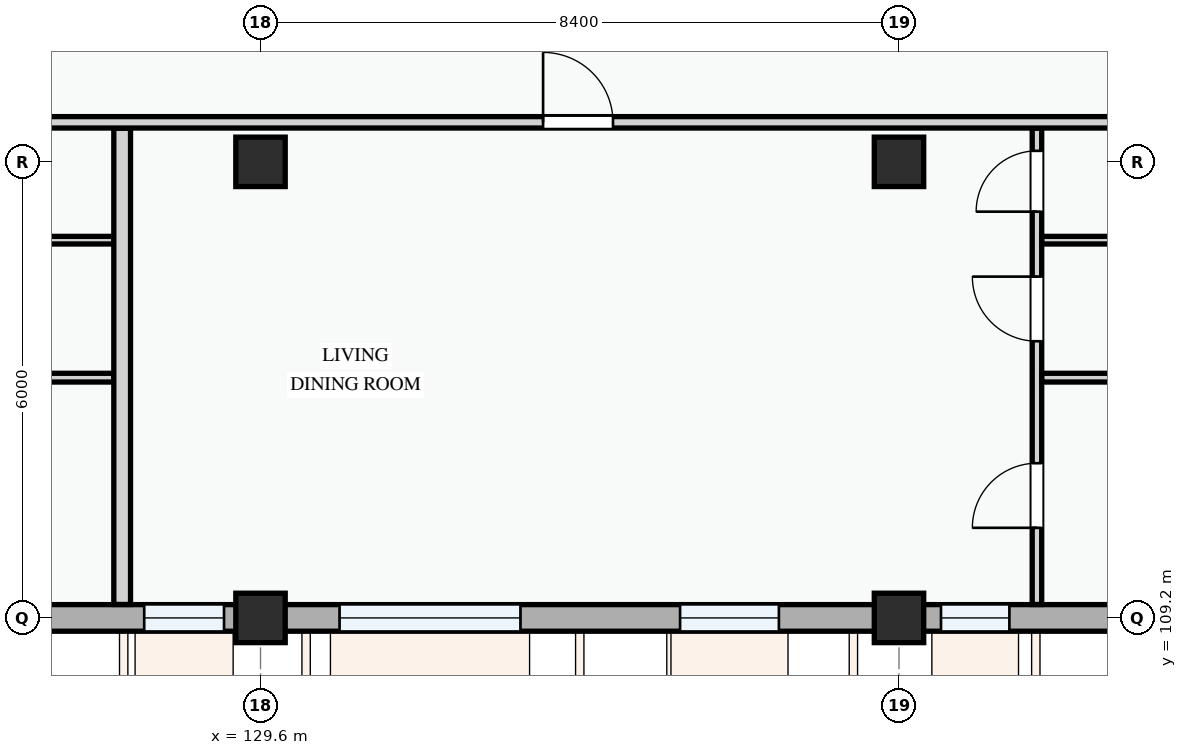
"""IFC4 building model, lengths in metres.
Left out: names, types, materials, properties, quantities, classifications, styles, units other than length and angle.
Written with IfcOpenShell. Run it as: python <this file> out.ifc"""

import sys

from ifc_helpers import new_model, si_unit, direction, frame, frame_2d, origin, origin_2d, place, context, subcontext, project, spatial, rectangle, extrude, element, fill, save


model = new_model("IFC4")
c1 = context("Model", 3, precision=1e-05, world=origin(), true_north=direction((0.0, 1.0)))
c2 = subcontext(c1, "Body", "Model", "MODEL_VIEW")
j1 = project(units=[si_unit("LENGTHUNIT", "METRE"), si_unit("PLANEANGLEUNIT", "RADIAN")], contexts=[c1])
p1 = place(None, origin())
s1 = spatial("IfcSite", under=j1, at=p1, CompositionType="ELEMENT")
p2 = place(p1, origin())
s2 = spatial("IfcBuilding", under=s1, at=p2, CompositionType="ELEMENT")
p3 = place(p2, frame((0.0, 0.0, 11.4)))
s3 = spatial("IfcBuildingStorey", under=s2, at=p3, CompositionType="ELEMENT", Elevation=11.4)
for number, where, z_axis, x_axis in (
    (1, (129.6, 109.2, 0.0), (0.0, 0.0, 1.0), (1.0, 0.0, 0.0)),
    (2, (129.6, 115.2, 0.0), (0.0, 0.0, 1.0), (1.0, 0.0, 0.0)),
    (3, (138.0, 109.2, 0.0), (0.0, 0.0, 1.0), (1.0, 0.0, 0.0)),
    (4, (138.0, 115.2, 0.0), (0.0, 0.0, 1.0), (1.0, 0.0, 0.0)),
):
    element("IfcColumn", number, at=place(p3, frame(where, z_axis=z_axis, x_axis=x_axis)), inside=s3, PredefinedType="COLUMN", context=c2, shape_type="SweptSolid", body=[
        extrude(rectangle(XDim=0.65, YDim=0.65, at=origin_2d()), origin(), (0.0, 0.0, 1.0), 3.3),
    ])
p4 = place(p3, frame((123.6, 109.2, 0.0), z_axis=(0.0, 0.0, 1.0), x_axis=(1.0, 0.0, 0.0)))
e5 = element("IfcWall", 5, at=p4, inside=s3, PredefinedType="STANDARD", context=c2, shape_type="SweptSolid", body=[
    extrude(rectangle(XDim=6.0, YDim=0.35, at=frame_2d((3.0, 0.0))), origin(), (0.0, 0.0, 1.0), 2.475),
])
p5 = place(p4, frame((1.51, 0.0, 0.78)))
e6 = element("IfcOpeningElement", 6, at=p5, cuts=e5, PredefinedType="OPENING", context=c2, shape_type="SweptSolid", body=[
    extrude(rectangle(XDim=1.35, YDim=1.55, at=frame_2d((0.675, 0.775))), frame((0.0, 0.185, 0.0), z_axis=(0.0, -1.0, 0.0), x_axis=(1.0, 0.0, 0.0)), (0.0, 0.0, 1.0), 0.37),
])
p6 = place(p4, frame((4.47, 0.0, 0.78)))
e7 = element("IfcOpeningElement", 7, at=p6, cuts=e5, PredefinedType="OPENING", context=c2, shape_type="SweptSolid", body=[
    extrude(rectangle(XDim=1.05, YDim=1.2, at=frame_2d((0.525, 0.6))), frame((0.0, 0.185, 0.0), z_axis=(0.0, -1.0, 0.0), x_axis=(1.0, 0.0, 0.0)), (0.0, 0.0, 1.0), 0.37),
])
p7 = place(p3, frame((129.6, 109.2, 0.0), z_axis=(0.0, 0.0, 1.0), x_axis=(1.0, 0.0, 0.0)))
e8 = element("IfcWall", 8, at=p7, inside=s3, PredefinedType="STANDARD", context=c2, shape_type="SweptSolid", body=[
    extrude(rectangle(XDim=8.4, YDim=0.35, at=frame_2d((4.2, 0.0))), origin(), (0.0, 0.0, 1.0), 2.375),
])
p8 = place(p7, frame((1.04, 0.0, 0.78)))
e9 = element("IfcOpeningElement", 9, at=p8, cuts=e8, PredefinedType="OPENING", context=c2, shape_type="SweptSolid", body=[
    extrude(rectangle(XDim=2.38, YDim=1.48, at=frame_2d((1.19, 0.74))), frame((0.0, 0.185, 0.0), z_axis=(0.0, -1.0, 0.0), x_axis=(1.0, 0.0, 0.0)), (0.0, 0.0, 1.0), 0.37),
])
p9 = place(p7, frame((5.52, 0.0, 0.78)))
e10 = element("IfcOpeningElement", 10, at=p9, cuts=e8, PredefinedType="OPENING", context=c2, shape_type="SweptSolid", body=[
    extrude(rectangle(XDim=1.3, YDim=1.4, at=frame_2d((0.65, 0.7))), frame((0.0, 0.185, 0.0), z_axis=(0.0, -1.0, 0.0), x_axis=(1.0, 0.0, 0.0)), (0.0, 0.0, 1.0), 0.37),
])
p10 = place(p3, frame((138.0, 109.2, 0.0), z_axis=(0.0, 0.0, 1.0), x_axis=(1.0, 0.0, 0.0)))
e11 = element("IfcWall", 11, at=p10, inside=s3, PredefinedType="STANDARD", context=c2, shape_type="SweptSolid", body=[
    extrude(rectangle(XDim=6.0, YDim=0.35, at=frame_2d((3.0, 0.0))), origin(), (0.0, 0.0, 1.0), 2.475),
])
p11 = place(p10, frame((0.552, 0.0, 0.78)))
e12 = element("IfcOpeningElement", 12, at=p11, cuts=e11, PredefinedType="OPENING", context=c2, shape_type="SweptSolid", body=[
    extrude(rectangle(XDim=0.9, YDim=1.2, at=frame_2d((0.45, 0.6))), frame((0.0, 0.185, 0.0), z_axis=(0.0, -1.0, 0.0), x_axis=(1.0, 0.0, 0.0)), (0.0, 0.0, 1.0), 0.37),
])
p12 = place(p10, frame((2.913, 0.0, 0.78)))
e13 = element("IfcOpeningElement", 13, at=p12, cuts=e11, PredefinedType="OPENING", context=c2, shape_type="SweptSolid", body=[
    extrude(rectangle(XDim=1.8, YDim=1.5, at=frame_2d((0.9, 0.75))), frame((0.0, 0.185, 0.0), z_axis=(0.0, -1.0, 0.0), x_axis=(1.0, 0.0, 0.0)), (0.0, 0.0, 1.0), 0.37),
])
p13 = place(p3, frame((117.014, 112.361, 0.0), z_axis=(0.0, 0.0, 1.0), x_axis=(1.0, 0.0, 0.0)))
e14 = element("IfcWall", 14, at=p13, inside=s3, PredefinedType="PARTITIONING", context=c2, shape_type="SweptSolid", body=[
    extrude(rectangle(XDim=10.654, YDim=0.115, at=frame_2d((5.327, 0.0))), origin(), (0.0, 0.0, 1.0), 3.0),
])
p14 = place(p3, frame((117.014, 114.17, 0.0), z_axis=(0.0, 0.0, 1.0), x_axis=(1.0, 0.0, 0.0)))
e15 = element("IfcWall", 15, at=p14, inside=s3, PredefinedType="PARTITIONING", context=c2, shape_type="SweptSolid", body=[
    extrude(rectangle(XDim=10.654, YDim=0.1, at=frame_2d((5.327, 0.0))), origin(), (0.0, 0.0, 1.0), 3.0),
])
p15 = place(p3, frame((139.815, 109.377, 0.0), z_axis=(0.0, 0.0, 1.0), x_axis=(0.0, 1.0, 0.0)))
e16 = element("IfcWall", 16, at=p15, inside=s3, PredefinedType="PARTITIONING", context=c2, shape_type="SweptSolid", body=[
    extrude(rectangle(XDim=6.266, YDim=0.125, at=frame_2d((3.133, 0.0))), origin(), (0.0, 0.0, 1.0), 3.0),
])
p16 = place(p15, frame((1.008, 0.0, 0.0)))
e17 = element("IfcOpeningElement", 17, at=p16, cuts=e16, PredefinedType="OPENING", context=c2, shape_type="SweptSolid", body=[
    extrude(rectangle(XDim=0.85, YDim=2.1, at=frame_2d((0.425, 1.05))), frame((0.0, 0.073, 0.0), z_axis=(0.0, -1.0, 0.0), x_axis=(1.0, 0.0, 0.0)), (0.0, 0.0, 1.0), 0.145),
])
p17 = place(p15, frame((3.463, 0.0, 0.0)))
e18 = element("IfcOpeningElement", 18, at=p17, cuts=e16, PredefinedType="OPENING", context=c2, shape_type="SweptSolid", body=[
    extrude(rectangle(XDim=0.85, YDim=2.1, at=frame_2d((0.425, 1.05))), frame((0.0, 0.073, 0.0), z_axis=(0.0, -1.0, 0.0), x_axis=(1.0, 0.0, 0.0)), (0.0, 0.0, 1.0), 0.145),
])
p18 = place(p15, frame((5.168, 0.0, 0.0)))
e19 = element("IfcOpeningElement", 19, at=p18, cuts=e16, PredefinedType="OPENING", context=c2, shape_type="SweptSolid", body=[
    extrude(rectangle(XDim=0.8, YDim=2.1, at=frame_2d((0.4, 1.05))), frame((0.0, 0.073, 0.0), z_axis=(0.0, -1.0, 0.0), x_axis=(1.0, 0.0, 0.0)), (0.0, 0.0, 1.0), 0.145),
])
p19 = place(p3, frame((139.879, 112.361, 0.0), z_axis=(0.0, 0.0, 1.0), x_axis=(1.0, 0.0, 0.0)))
e20 = element("IfcWall", 20, at=p19, inside=s3, PredefinedType="PARTITIONING", context=c2, shape_type="SweptSolid", body=[
    extrude(rectangle(XDim=10.094, YDim=0.115, at=frame_2d((5.047, 0.0))), origin(), (0.0, 0.0, 1.0), 3.0),
])
p20 = place(p3, frame((139.879, 114.17, 0.0), z_axis=(0.0, 0.0, 1.0), x_axis=(1.0, 0.0, 0.0)))
e21 = element("IfcWall", 21, at=p20, inside=s3, PredefinedType="PARTITIONING", context=c2, shape_type="SweptSolid", body=[
    extrude(rectangle(XDim=10.094, YDim=0.1, at=frame_2d((5.047, 0.0))), origin(), (0.0, 0.0, 1.0), 3.0),
])
p21 = place(p3, frame((127.78, 109.377, 0.0), z_axis=(0.0, 0.0, 1.0), x_axis=(0.0, 1.0, 0.0)))
e22 = element("IfcWall", 22, at=p21, inside=s3, PredefinedType="PARTITIONING", context=c2, shape_type="SweptSolid", body=[
    extrude(rectangle(XDim=6.266, YDim=0.22, at=frame_2d((3.133, 0.0))), origin(), (0.0, 0.0, 1.0), 3.0),
])
p22 = place(p3, frame((80.577, 115.72, 0.0), z_axis=(0.0, 0.0, 1.0), x_axis=(1.0, 0.0, 0.0)))
e23 = element("IfcWall", 23, at=p22, inside=s3, PredefinedType="PARTITIONING", context=c2, shape_type="SweptSolid", body=[
    extrude(rectangle(XDim=69.473, YDim=0.15, at=frame_2d((34.737, 0.0))), origin(), (0.0, 0.0, 1.0), 3.0),
])
p23 = place(p22, frame((9.531, 0.0, 0.0)))
e24 = element("IfcOpeningElement", 24, at=p23, cuts=e23, PredefinedType="OPENING", context=c2, shape_type="SweptSolid", body=[
    extrude(rectangle(XDim=0.92, YDim=2.1, at=frame_2d((0.46, 1.05))), frame((0.0, 0.085, 0.0), z_axis=(0.0, -1.0, 0.0), x_axis=(1.0, 0.0, 0.0)), (0.0, 0.0, 1.0), 0.17),
])
p24 = place(p22, frame((23.793, 0.0, 0.0)))
e25 = element("IfcOpeningElement", 25, at=p24, cuts=e23, PredefinedType="OPENING", context=c2, shape_type="SweptSolid", body=[
    extrude(rectangle(XDim=0.92, YDim=2.1, at=frame_2d((0.46, 1.05))), frame((0.0, 0.085, 0.0), z_axis=(0.0, -1.0, 0.0), x_axis=(1.0, 0.0, 0.0)), (0.0, 0.0, 1.0), 0.17),
])
p25 = place(p22, frame((52.74, 0.0, 0.0)))
e26 = element("IfcOpeningElement", 26, at=p25, cuts=e23, PredefinedType="OPENING", context=c2, shape_type="SweptSolid", body=[
    extrude(rectangle(XDim=0.92, YDim=2.1, at=frame_2d((0.46, 1.05))), frame((0.0, 0.085, 0.0), z_axis=(0.0, -1.0, 0.0), x_axis=(1.0, 0.0, 0.0)), (0.0, 0.0, 1.0), 0.17),
])
p26 = place(p6, origin())
e27 = element("IfcWindow", 27, at=p26, inside=s3, PartitioningType="SINGLE_PANEL", PredefinedType="WINDOW", context=c2, shape_type="SweptSolid", body=[
    extrude(rectangle(XDim=1.05, YDim=1.2, at=frame_2d((0.525, 0.6))), frame((0.0, 0.03, 0.0), z_axis=(0.0, -1.0, 0.0), x_axis=(1.0, 0.0, 0.0)), (0.0, 0.0, 1.0), 0.06),
])
fill(e7, e27)
p27 = place(p8, origin())
e28 = element("IfcWindow", 28, at=p27, inside=s3, PartitioningType="DOUBLE_PANEL_VERTICAL", PredefinedType="WINDOW", context=c2, shape_type="SweptSolid", body=[
    extrude(rectangle(XDim=2.38, YDim=1.48, at=frame_2d((1.19, 0.74))), frame((0.0, 0.03, 0.0), z_axis=(0.0, -1.0, 0.0), x_axis=(1.0, 0.0, 0.0)), (0.0, 0.0, 1.0), 0.06),
])
fill(e9, e28)
p28 = place(p9, origin())
e29 = element("IfcWindow", 29, at=p28, inside=s3, PartitioningType="SINGLE_PANEL", PredefinedType="WINDOW", context=c2, shape_type="SweptSolid", body=[
    extrude(rectangle(XDim=1.3, YDim=1.4, at=frame_2d((0.65, 0.7))), frame((0.0, 0.03, 0.0), z_axis=(0.0, -1.0, 0.0), x_axis=(1.0, 0.0, 0.0)), (0.0, 0.0, 1.0), 0.06),
])
fill(e10, e29)
p29 = place(p11, origin())
e30 = element("IfcWindow", 30, at=p29, inside=s3, PartitioningType="SINGLE_PANEL", PredefinedType="WINDOW", context=c2, shape_type="SweptSolid", body=[
    extrude(rectangle(XDim=0.9, YDim=1.2, at=frame_2d((0.45, 0.6))), frame((0.0, 0.03, 0.0), z_axis=(0.0, -1.0, 0.0), x_axis=(1.0, 0.0, 0.0)), (0.0, 0.0, 1.0), 0.06),
])
fill(e12, e30)
p30 = place(p16, origin())
e31 = element("IfcDoor", 31, at=p30, inside=s3, OperationType="SINGLE_SWING_LEFT", PredefinedType="DOOR", context=c2, shape_type="SweptSolid", body=[
    extrude(rectangle(XDim=0.85, YDim=2.1, at=frame_2d((0.425, 1.05))), frame((0.0, 0.025, 0.0), z_axis=(0.0, -1.0, 0.0), x_axis=(1.0, 0.0, 0.0)), (0.0, 0.0, 1.0), 0.05),
])
fill(e17, e31)
p31 = place(p17, origin())
e32 = element("IfcDoor", 32, at=p31, inside=s3, OperationType="SINGLE_SWING_RIGHT", PredefinedType="DOOR", context=c2, shape_type="SweptSolid", body=[
    extrude(rectangle(XDim=0.85, YDim=2.1, at=frame_2d((0.425, 1.05))), frame((0.0, 0.025, 0.0), z_axis=(0.0, -1.0, 0.0), x_axis=(1.0, 0.0, 0.0)), (0.0, 0.0, 1.0), 0.05),
])
fill(e18, e32)
p32 = place(p18, origin())
e33 = element("IfcDoor", 33, at=p32, inside=s3, OperationType="SINGLE_SWING_LEFT", PredefinedType="DOOR", context=c2, shape_type="SweptSolid", body=[
    extrude(rectangle(XDim=0.8, YDim=2.1, at=frame_2d((0.4, 1.05))), frame((0.0, 0.025, 0.0), z_axis=(0.0, -1.0, 0.0), x_axis=(1.0, 0.0, 0.0)), (0.0, 0.0, 1.0), 0.05),
])
fill(e19, e33)
p33 = place(p25, origin())
e34 = element("IfcDoor", 34, at=p33, inside=s3, OperationType="SINGLE_SWING_LEFT", PredefinedType="DOOR", context=c2, shape_type="SweptSolid", body=[
    extrude(rectangle(XDim=0.92, YDim=2.1, at=frame_2d((0.46, 1.05))), frame((0.0, 0.025, 0.0), z_axis=(0.0, -1.0, 0.0), x_axis=(1.0, 0.0, 0.0)), (0.0, 0.0, 1.0), 0.05),
])
fill(e26, e34)
save(model, sys.argv[1])
